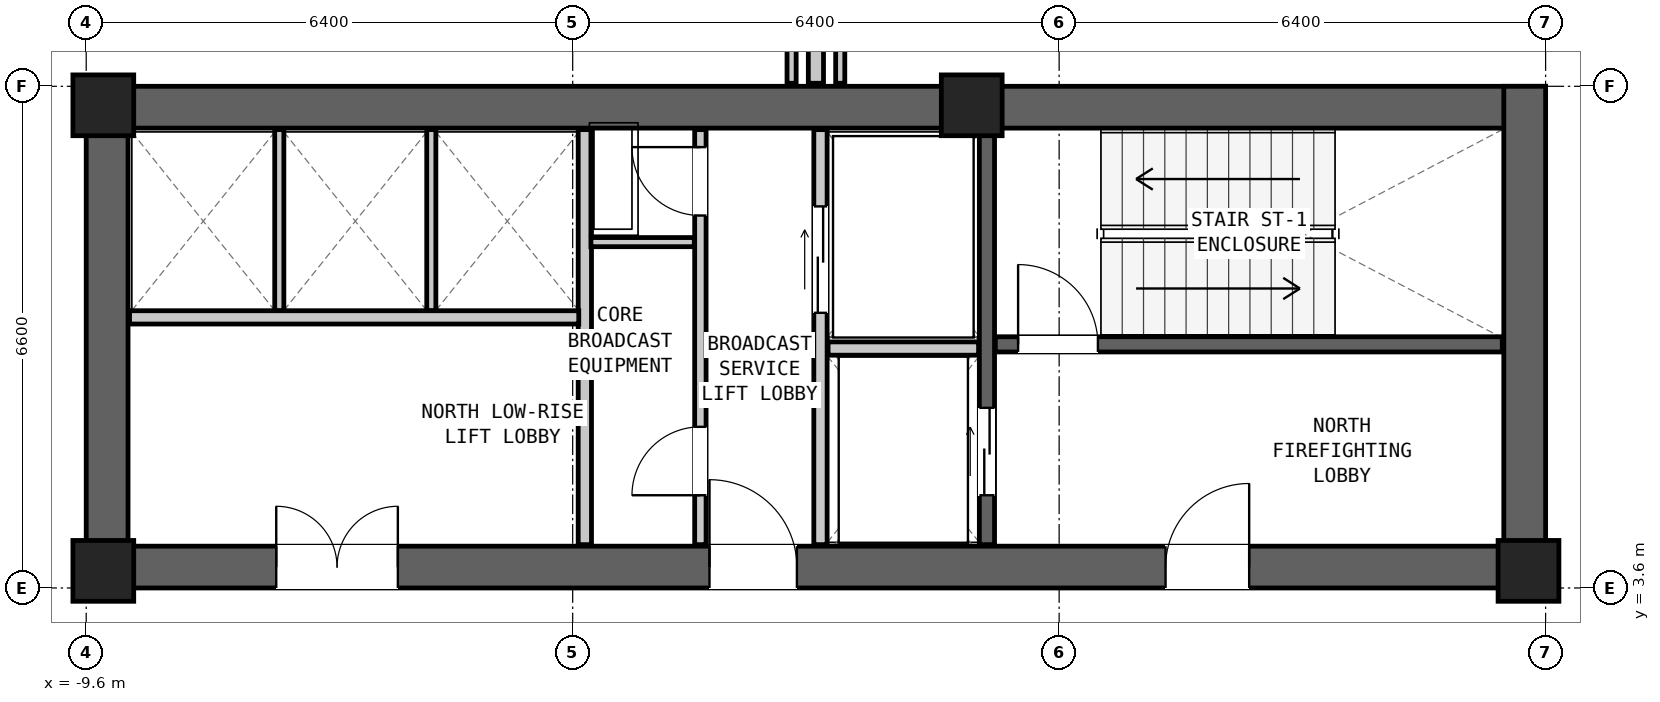
"""IFC4 building model, lengths in metres.
Left out: names, types, materials, properties, quantities, classifications, styles, units other than length and angle.
Written with IfcOpenShell. Run it as: python <this file> out.ifc"""

import sys

from ifc_helpers import new_model, si_unit, direction, frame, frame_2d, origin, origin_2d, place, context, subcontext, project, spatial, rectangle, extrude, element, fill, save


model = new_model("IFC4")
c1 = context("Model", 3, precision=1e-05, world=origin(), true_north=direction((0.0, 1.0)))
c2 = subcontext(c1, "Body", "Model", "MODEL_VIEW")
j1 = project(units=[si_unit("LENGTHUNIT", "METRE"), si_unit("PLANEANGLEUNIT", "RADIAN")], contexts=[c1])
p1 = place(None, origin())
s1 = spatial("IfcSite", under=j1, at=p1, CompositionType="ELEMENT")
p2 = place(p1, origin())
s2 = spatial("IfcBuilding", under=s1, at=p2, CompositionType="ELEMENT")
p3 = place(p2, frame((0.0, 0.0, 108.45)))
s3 = spatial("IfcBuildingStorey", under=s2, at=p3, CompositionType="ELEMENT", Elevation=108.45)
p4 = place(p3, frame((-9.6, 9.925, 0.0), z_axis=(0.0, 0.0, 1.0), x_axis=(1.0, 0.0, 0.0)))
e1 = element("IfcWall", 1, at=p4, inside=s3, PredefinedType="SHEAR", context=c2, shape_type="SweptSolid", body=[
    extrude(rectangle(XDim=19.2, YDim=0.55, at=frame_2d((9.6, 0.0))), origin(), (0.0, 0.0, 1.0), 4.35),
])
p5 = place(p3, frame((-9.6, 3.875, 0.0), z_axis=(0.0, 0.0, 1.0), x_axis=(1.0, 0.0, 0.0)))
e2 = element("IfcWall", 2, at=p5, inside=s3, PredefinedType="SHEAR", context=c2, shape_type="SweptSolid", body=[
    extrude(rectangle(XDim=19.2, YDim=0.55, at=frame_2d((9.6, 0.0))), origin(), (0.0, 0.0, 1.0), 4.35),
])
p6 = place(p5, frame((14.2, 0.0, 0.0)))
e3 = element("IfcOpeningElement", 3, at=p6, cuts=e2, PredefinedType="OPENING", context=c2, shape_type="SweptSolid", body=[
    extrude(rectangle(XDim=1.1, YDim=2.08, at=frame_2d((0.55, 1.04))), frame((0.0, 0.287, 0.0), z_axis=(0.0, -1.0, 0.0), x_axis=(1.0, 0.0, 0.0)), (0.0, 0.0, 1.0), 0.574),
])
p7 = place(p5, frame((8.2, 0.0, 0.0)))
e4 = element("IfcOpeningElement", 4, at=p7, cuts=e2, PredefinedType="OPENING", context=c2, shape_type="SweptSolid", body=[
    extrude(rectangle(XDim=1.15, YDim=2.1, at=frame_2d((0.575, 1.05))), frame((0.0, 0.287, 0.0), z_axis=(0.0, -1.0, 0.0), x_axis=(1.0, 0.0, 0.0)), (0.0, 0.0, 1.0), 0.574),
])
p8 = place(p5, frame((2.5, 0.0, 0.0)))
e5 = element("IfcOpeningElement", 5, at=p8, cuts=e2, PredefinedType="OPENING", context=c2, shape_type="SweptSolid", body=[
    extrude(rectangle(XDim=1.6, YDim=2.12, at=frame_2d((0.8, 1.06))), frame((0.0, 0.287, 0.0), z_axis=(0.0, -1.0, 0.0), x_axis=(1.0, 0.0, 0.0)), (0.0, 0.0, 1.0), 0.574),
])
for number, where, z_axis, x_axis in (
    (6, (-9.325, 3.6, 0.0), (0.0, 0.0, 1.0), (0.0, 1.0, 0.0)),
    (7, (9.325, 3.6, 0.0), (0.0, 0.0, 1.0), (0.0, 1.0, 0.0)),
):
    element("IfcWall", number, at=place(p3, frame(where, z_axis=z_axis, x_axis=x_axis)), inside=s3, PredefinedType="SHEAR", context=c2, shape_type="SweptSolid", body=[
        extrude(rectangle(XDim=6.6, YDim=0.55, at=frame_2d((3.3, 0.0))), origin(), (0.0, 0.0, 1.0), 4.35),
    ])
for number, where, z_axis, x_axis in (
    (8, (-9.375, 9.95, 0.0), (0.0, 0.0, 1.0), (1.0, 0.0, 0.0)),
    (9, (2.05, 9.95, 0.0), (0.0, 0.0, 1.0), (1.0, 0.0, 0.0)),
    (10, (-9.375, 3.825, 0.0), (0.0, 0.0, 1.0), (1.0, 0.0, 0.0)),
    (11, (9.375, 3.825, 0.0), (0.0, 0.0, 1.0), (1.0, 0.0, 0.0)),
):
    element("IfcColumn", number, at=place(p3, frame(where, z_axis=z_axis, x_axis=x_axis)), inside=s3, PredefinedType="COLUMN", context=c2, shape_type="SweptSolid", body=[
        extrude(rectangle(XDim=0.8, YDim=0.8, at=origin_2d()), origin(), (0.0, 0.0, 1.0), 4.35),
    ])
p9 = place(p3, frame((2.36, 6.805, 0.0), z_axis=(0.0, 0.0, 1.0), x_axis=(1.0, 0.0, 0.0)))
e12 = element("IfcWall", 12, at=p9, inside=s3, PredefinedType="SHEAR", context=c2, shape_type="SweptSolid", body=[
    extrude(rectangle(XDim=6.67, YDim=0.2, at=frame_2d((3.335, 0.0))), origin(), (0.0, 0.0, 1.0), 4.13),
])
p10 = place(p9, frame((0.3, 0.0, 0.0)))
e13 = element("IfcOpeningElement", 13, at=p10, cuts=e12, PredefinedType="OPENING", context=c2, shape_type="SweptSolid", body=[
    extrude(rectangle(XDim=1.05, YDim=2.08, at=frame_2d((0.525, 1.04))), frame((0.0, 0.112, 0.0), z_axis=(0.0, -1.0, 0.0), x_axis=(1.0, 0.0, 0.0)), (0.0, 0.0, 1.0), 0.224),
])
p11 = place(p3, frame((2.25, 4.17, 0.0), z_axis=(0.0, 0.0, 1.0), x_axis=(0.0, 1.0, 0.0)))
e14 = element("IfcWall", 14, at=p11, inside=s3, PredefinedType="SHEAR", context=c2, shape_type="SweptSolid", body=[
    extrude(rectangle(XDim=5.46, YDim=0.2, at=frame_2d((2.73, 0.0))), origin(), (0.0, 0.0, 1.0), 4.13),
])
p12 = place(p11, frame((0.65, 0.0, 0.0)))
e15 = element("IfcOpeningElement", 15, at=p12, cuts=e14, PredefinedType="OPENING", context=c2, shape_type="SweptSolid", body=[
    extrude(rectangle(XDim=1.15, YDim=2.08, at=frame_2d((0.575, 1.04))), frame((0.0, 0.112, 0.0), z_axis=(0.0, -1.0, 0.0), x_axis=(1.0, 0.0, 0.0)), (0.0, 0.0, 1.0), 0.224),
])
p13 = place(p3, frame((0.06, 4.17, 0.0), z_axis=(0.0, 0.0, 1.0), x_axis=(0.0, 1.0, 0.0)))
e16 = element("IfcWall", 16, at=p13, inside=s3, PredefinedType="PARTITIONING", context=c2, shape_type="SweptSolid", body=[
    extrude(rectangle(XDim=5.46, YDim=0.175, at=frame_2d((2.73, 0.0))), origin(), (0.0, 0.0, 1.0), 4.13),
])
p14 = place(p13, frame((3.05, 0.0, 0.0)))
e17 = element("IfcOpeningElement", 17, at=p14, cuts=e16, PredefinedType="OPENING", context=c2, shape_type="SweptSolid", body=[
    extrude(rectangle(XDim=1.4, YDim=2.12, at=frame_2d((0.7, 1.06))), frame((0.0, 0.1, 0.0), z_axis=(0.0, -1.0, 0.0), x_axis=(1.0, 0.0, 0.0)), (0.0, 0.0, 1.0), 0.199),
])
p15 = place(p3, frame((0.16, 6.75, 0.0), z_axis=(0.0, 0.0, 1.0), x_axis=(1.0, 0.0, 0.0)))
e18 = element("IfcWall", 18, at=p15, inside=s3, PredefinedType="PARTITIONING", context=c2, shape_type="SweptSolid", body=[
    extrude(rectangle(XDim=1.98, YDim=0.175, at=frame_2d((0.99, 0.0))), origin(), (0.0, 0.0, 1.0), 4.13),
])
p16 = place(p3, frame((-3.04, 4.17, 0.0), z_axis=(0.0, 0.0, 1.0), x_axis=(0.0, 1.0, 0.0)))
e19 = element("IfcWall", 19, at=p16, inside=s3, PredefinedType="PARTITIONING", context=c2, shape_type="SweptSolid", body=[
    extrude(rectangle(XDim=5.46, YDim=0.175, at=frame_2d((2.73, 0.0))), origin(), (0.0, 0.0, 1.0), 4.13),
])
p17 = place(p3, frame((-1.52, 4.17, 0.0), z_axis=(0.0, 0.0, 1.0), x_axis=(0.0, 1.0, 0.0)))
e20 = element("IfcWall", 20, at=p17, inside=s3, PredefinedType="PARTITIONING", context=c2, shape_type="SweptSolid", body=[
    extrude(rectangle(XDim=5.46, YDim=0.15, at=frame_2d((2.73, 0.0))), origin(), (0.0, 0.0, 1.0), 4.13),
])
p18 = place(p17, frame((4.33, 0.0, 0.0)))
e21 = element("IfcOpeningElement", 21, at=p18, cuts=e20, PredefinedType="OPENING", context=c2, shape_type="SweptSolid", body=[
    extrude(rectangle(XDim=0.9, YDim=2.05, at=frame_2d((0.45, 1.025))), frame((0.0, 0.087, 0.0), z_axis=(0.0, -1.0, 0.0), x_axis=(1.0, 0.0, 0.0)), (0.0, 0.0, 1.0), 0.174),
])
p19 = place(p17, frame((0.65, 0.0, 0.0)))
e22 = element("IfcOpeningElement", 22, at=p19, cuts=e20, PredefinedType="OPENING", context=c2, shape_type="SweptSolid", body=[
    extrude(rectangle(XDim=0.9, YDim=2.05, at=frame_2d((0.45, 1.025))), frame((0.0, 0.087, 0.0), z_axis=(0.0, -1.0, 0.0), x_axis=(1.0, 0.0, 0.0)), (0.0, 0.0, 1.0), 0.174),
])
p20 = place(p3, frame((-2.96, 8.15, 0.0), z_axis=(0.0, 0.0, 1.0), x_axis=(1.0, 0.0, 0.0)))
e23 = element("IfcWall", 23, at=p20, inside=s3, PredefinedType="PARTITIONING", context=c2, shape_type="SweptSolid", body=[
    extrude(rectangle(XDim=1.36, YDim=0.12, at=frame_2d((0.68, 0.0))), origin(), (0.0, 0.0, 1.0), 4.13),
])
p21 = place(p3, frame((-9.03, 7.16, 0.0), z_axis=(0.0, 0.0, 1.0), x_axis=(1.0, 0.0, 0.0)))
e24 = element("IfcWall", 24, at=p21, inside=s3, PredefinedType="PARTITIONING", context=c2, shape_type="SweptSolid", body=[
    extrude(rectangle(XDim=5.91, YDim=0.175, at=frame_2d((2.955, 0.0))), origin(), (0.0, 0.0, 1.0), 4.13),
])
for number, where, z_axis, x_axis in (
    (25, (-7.06, 7.25, 0.0), (0.0, 0.0, 1.0), (0.0, 1.0, 0.0)),
    (26, (-5.06, 7.25, 0.0), (0.0, 0.0, 1.0), (0.0, 1.0, 0.0)),
):
    element("IfcWall", number, at=place(p3, frame(where, z_axis=z_axis, x_axis=x_axis)), inside=s3, PredefinedType="PARTITIONING", context=c2, shape_type="SweptSolid", body=[
        extrude(rectangle(XDim=2.38, YDim=0.12, at=frame_2d((1.19, 0.0))), origin(), (0.0, 0.0, 1.0), 4.13),
    ])
p22 = place(p3, frame((0.0, 10.24, 0.0), z_axis=(0.0, 0.0, 1.0), x_axis=(0.0, 1.0, 0.0)))
e27 = element("IfcWall", 27, at=p22, inside=s3, PredefinedType="PARTITIONING", context=c2, shape_type="SweptSolid", body=[
    extrude(rectangle(XDim=14.55, YDim=0.2, at=frame_2d((7.275, 0.0))), origin(), (0.0, 0.0, 1.0), 2.31),
])
for number, where, z_axis, x_axis in (
    (28, (-0.32, 10.24, 0.0), (0.0, 0.0, 1.0), (0.0, 1.0, 0.0)),
    (29, (0.32, 10.24, 0.0), (0.0, 0.0, 1.0), (0.0, 1.0, 0.0)),
):
    element("IfcWall", number, at=place(p3, frame(where, z_axis=z_axis, x_axis=x_axis)), inside=s3, PredefinedType="PARTITIONING", context=c2, shape_type="SweptSolid", body=[
        extrude(rectangle(XDim=2.36, YDim=0.12, at=frame_2d((1.18, 0.0))), origin(), (0.0, 0.0, 1.0), 2.31),
    ])
p23 = place(p10, origin())
e30 = element("IfcDoor", 30, at=p23, inside=s3, OperationType="SINGLE_SWING_LEFT", PredefinedType="DOOR", context=c2, shape_type="SweptSolid", body=[
    extrude(rectangle(XDim=1.05, YDim=2.08, at=frame_2d((0.525, 1.04))), frame((0.0, 0.025, 0.0), z_axis=(0.0, -1.0, 0.0), x_axis=(1.0, 0.0, 0.0)), (0.0, 0.0, 1.0), 0.05),
])
fill(e13, e30)
p24 = place(p6, origin())
e31 = element("IfcDoor", 31, at=p24, inside=s3, OperationType="SINGLE_SWING_RIGHT", PredefinedType="DOOR", context=c2, shape_type="SweptSolid", body=[
    extrude(rectangle(XDim=1.1, YDim=2.08, at=frame_2d((0.55, 1.04))), frame((0.0, 0.025, 0.0), z_axis=(0.0, -1.0, 0.0), x_axis=(1.0, 0.0, 0.0)), (0.0, 0.0, 1.0), 0.05),
])
fill(e3, e31)
p25 = place(p12, origin())
e32 = element("IfcDoor", 32, at=p25, inside=s3, OperationType="DOUBLE_DOOR_SLIDING", PredefinedType="DOOR", context=c2, shape_type="SweptSolid", body=[
    extrude(rectangle(XDim=1.15, YDim=2.08, at=frame_2d((0.575, 1.04))), frame((0.0, 0.025, 0.0), z_axis=(0.0, -1.0, 0.0), x_axis=(1.0, 0.0, 0.0)), (0.0, 0.0, 1.0), 0.05),
])
fill(e15, e32)
p26 = place(p14, origin())
e33 = element("IfcDoor", 33, at=p26, inside=s3, OperationType="DOUBLE_DOOR_SLIDING", PredefinedType="DOOR", context=c2, shape_type="SweptSolid", body=[
    extrude(rectangle(XDim=1.4, YDim=2.12, at=frame_2d((0.7, 1.06))), frame((0.0, 0.025, 0.0), z_axis=(0.0, -1.0, 0.0), x_axis=(1.0, 0.0, 0.0)), (0.0, 0.0, 1.0), 0.05),
])
fill(e17, e33)
p27 = place(p7, origin())
e34 = element("IfcDoor", 34, at=p27, inside=s3, OperationType="SINGLE_SWING_LEFT", PredefinedType="DOOR", context=c2, shape_type="SweptSolid", body=[
    extrude(rectangle(XDim=1.15, YDim=2.1, at=frame_2d((0.575, 1.05))), frame((0.0, 0.025, 0.0), z_axis=(0.0, -1.0, 0.0), x_axis=(1.0, 0.0, 0.0)), (0.0, 0.0, 1.0), 0.05),
])
fill(e4, e34)
p28 = place(p18, origin())
e35 = element("IfcDoor", 35, at=p28, inside=s3, OperationType="SINGLE_SWING_RIGHT", PredefinedType="DOOR", context=c2, shape_type="SweptSolid", body=[
    extrude(rectangle(XDim=0.9, YDim=2.05, at=frame_2d((0.45, 1.025))), frame((0.0, 0.025, 0.0), z_axis=(0.0, -1.0, 0.0), x_axis=(1.0, 0.0, 0.0)), (0.0, 0.0, 1.0), 0.05),
])
fill(e21, e35)
p29 = place(p19, origin())
e36 = element("IfcDoor", 36, at=p29, inside=s3, OperationType="SINGLE_SWING_LEFT", PredefinedType="DOOR", context=c2, shape_type="SweptSolid", body=[
    extrude(rectangle(XDim=0.9, YDim=2.05, at=frame_2d((0.45, 1.025))), frame((0.0, 0.025, 0.0), z_axis=(0.0, -1.0, 0.0), x_axis=(1.0, 0.0, 0.0)), (0.0, 0.0, 1.0), 0.05),
])
fill(e22, e36)
p30 = place(p8, origin())
e37 = element("IfcDoor", 37, at=p30, inside=s3, OperationType="DOUBLE_DOOR_SINGLE_SWING", PredefinedType="DOOR", context=c2, shape_type="SweptSolid", body=[
    extrude(rectangle(XDim=1.6, YDim=2.12, at=frame_2d((0.8, 1.06))), frame((0.0, 0.025, 0.0), z_axis=(0.0, -1.0, 0.0), x_axis=(1.0, 0.0, 0.0)), (0.0, 0.0, 1.0), 0.05),
])
fill(e5, e37)
save(model, sys.argv[1])
